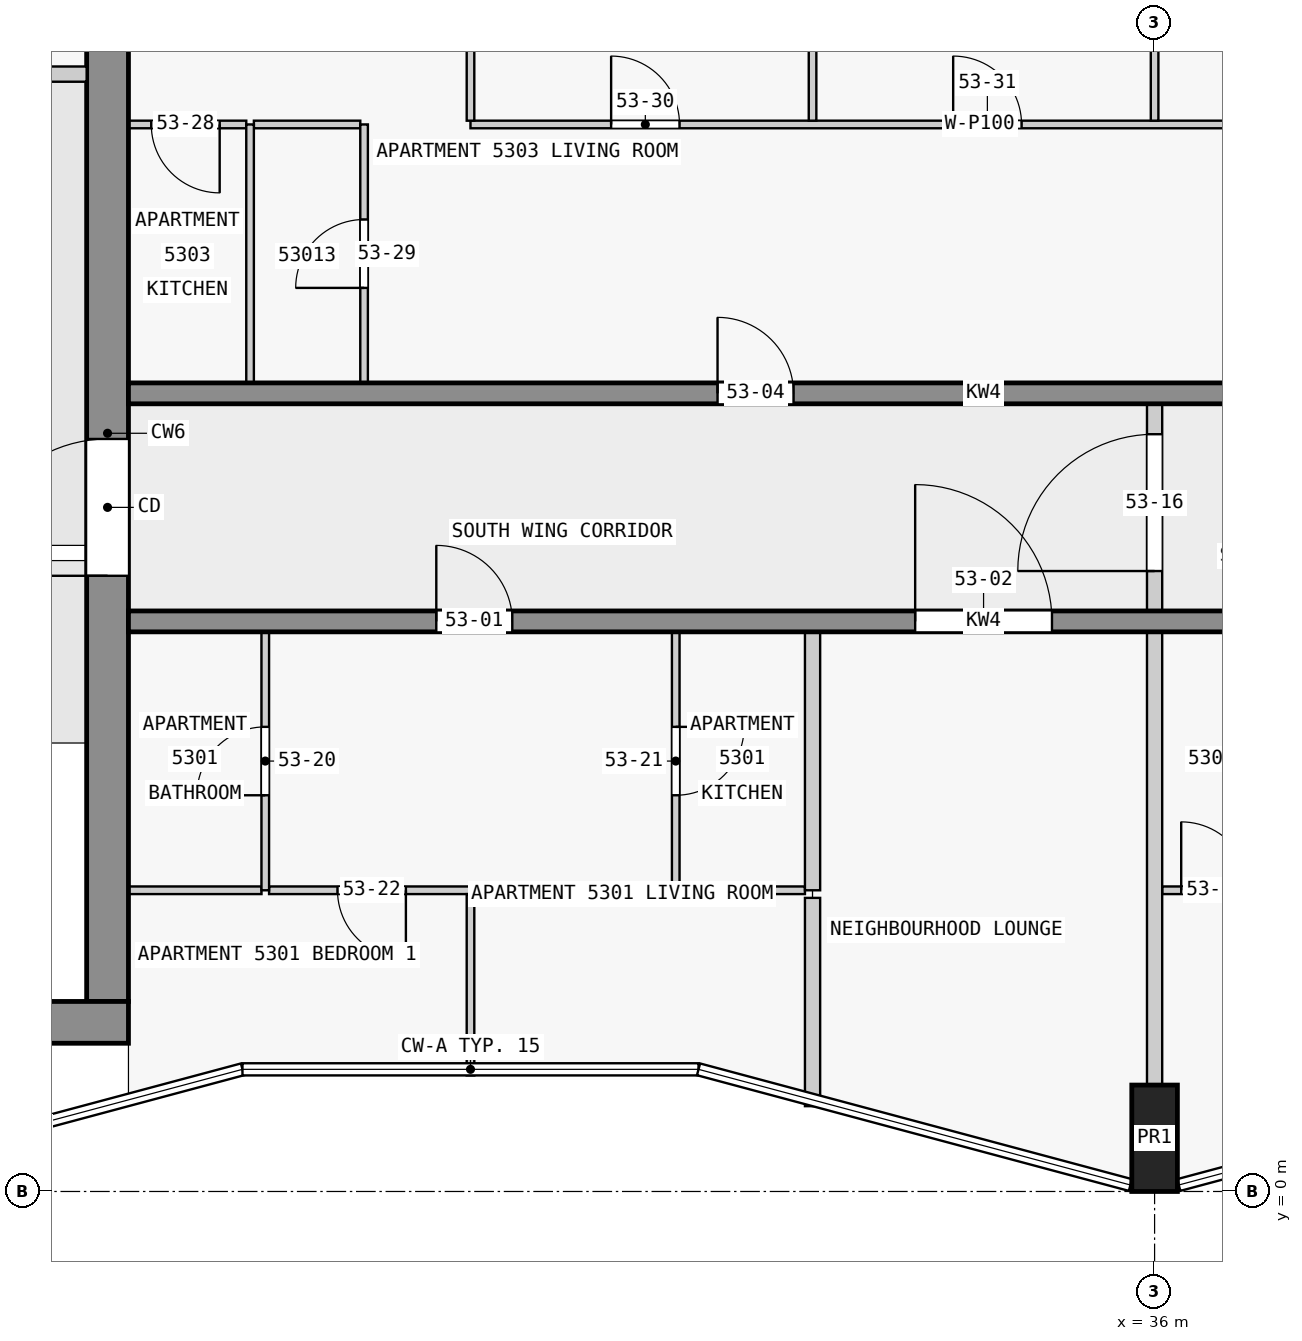
"""IFC4 building model, lengths in metres.
Left out: names, types, materials, properties, quantities, classifications, styles, units other than length and angle.
Written with IfcOpenShell. Run it as: python <this file> out.ifc"""

import sys

from ifc_helpers import new_model, si_unit, direction, frame, frame_2d, origin, origin_2d, place, context, subcontext, project, spatial, rectangle, extrude, element, fill, save


model = new_model("IFC4")
c1 = context("Model", 3, precision=1e-05, world=origin(), true_north=direction((0.0, 1.0)))
c2 = subcontext(c1, "Body", "Model", "MODEL_VIEW")
j1 = project(units=[si_unit("LENGTHUNIT", "METRE"), si_unit("PLANEANGLEUNIT", "RADIAN")], contexts=[c1])
p1 = place(None, origin())
s1 = spatial("IfcSite", under=j1, at=p1, CompositionType="ELEMENT")
p2 = place(p1, origin())
s2 = spatial("IfcBuilding", under=s1, at=p2, CompositionType="ELEMENT")
p3 = place(p2, frame((0.0, 0.0, 204.9)))
s3 = spatial("IfcBuildingStorey", under=s2, at=p3, CompositionType="ELEMENT", Elevation=204.9)
p4 = place(p3, frame((36.0, 0.7, 0.0), z_axis=(0.0, 0.0, 1.0), x_axis=(1.0, 0.0, 0.0)))
e1 = element("IfcColumn", 1, at=p4, inside=s3, PredefinedType="COLUMN", context=c2, shape_type="SweptSolid", body=[
    extrude(rectangle(XDim=0.6, YDim=1.4, at=origin_2d()), origin(), (0.0, 0.0, 1.0), 3.5),
])
p5 = place(p3, frame((1.75, 2.225, 0.0), z_axis=(0.0, 0.0, 1.0), x_axis=(1.0, 0.0, 0.0)))
e2 = element("IfcWall", 2, at=p5, inside=s3, PredefinedType="SHEAR", context=c2, shape_type="SweptSolid", body=[
    extrude(rectangle(XDim=20.75, YDim=0.55, at=frame_2d((10.375, 0.0))), origin(), (0.0, 0.0, 1.0), 3.25),
])
p6 = place(p3, frame((22.225, 2.5, 0.0), z_axis=(0.0, 0.0, 1.0), x_axis=(0.0, 1.0, 0.0)))
e3 = element("IfcWall", 3, at=p6, inside=s3, PredefinedType="SHEAR", context=c2, shape_type="SweptSolid", body=[
    extrude(rectangle(XDim=14.95, YDim=0.55, at=frame_2d((7.475, 0.0))), origin(), (0.0, 0.0, 1.0), 3.25),
])
p7 = place(p6, frame((5.6, 0.0, 0.0)))
e4 = element("IfcOpeningElement", 4, at=p7, cuts=e3, PredefinedType="OPENING", context=c2, shape_type="SweptSolid", body=[
    extrude(rectangle(XDim=1.8, YDim=2.1, at=frame_2d((0.9, 1.05))), frame((0.0, 0.285, 0.0), z_axis=(0.0, -1.0, 0.0), x_axis=(1.0, 0.0, 0.0)), (0.0, 0.0, 1.0), 0.57),
])
p8 = place(p3, frame((22.5, 7.5, 0.0), z_axis=(0.0, 0.0, 1.0), x_axis=(1.0, 0.0, 0.0)))
e5 = element("IfcWall", 5, at=p8, inside=s3, PredefinedType="SHEAR", context=c2, shape_type="SweptSolid", body=[
    extrude(rectangle(XDim=22.5, YDim=0.275, at=frame_2d((11.25, 0.0))), origin(), (0.0, 0.0, 1.0), 3.25),
])
p9 = place(p8, frame((4.05, 0.0, 0.0)))
e6 = element("IfcOpeningElement", 6, at=p9, cuts=e5, PredefinedType="OPENING", context=c2, shape_type="SweptSolid", body=[
    extrude(rectangle(XDim=1.0, YDim=2.1, at=frame_2d((0.5, 1.05))), frame((0.0, 0.147, 0.0), z_axis=(0.0, -1.0, 0.0), x_axis=(1.0, 0.0, 0.0)), (0.0, 0.0, 1.0), 0.295),
])
p10 = place(p8, frame((10.35, 0.0, 0.0)))
e7 = element("IfcOpeningElement", 7, at=p10, cuts=e5, PredefinedType="OPENING", context=c2, shape_type="SweptSolid", body=[
    extrude(rectangle(XDim=1.8, YDim=2.1, at=frame_2d((0.9, 1.05))), frame((0.0, 0.147, 0.0), z_axis=(0.0, -1.0, 0.0), x_axis=(1.0, 0.0, 0.0)), (0.0, 0.0, 1.0), 0.295),
])
p11 = place(p8, frame((16.85, 0.0, 0.0)))
e8 = element("IfcOpeningElement", 8, at=p11, cuts=e5, PredefinedType="OPENING", context=c2, shape_type="SweptSolid", body=[
    extrude(rectangle(XDim=1.0, YDim=2.1, at=frame_2d((0.5, 1.05))), frame((0.0, 0.147, 0.0), z_axis=(0.0, -1.0, 0.0), x_axis=(1.0, 0.0, 0.0)), (0.0, 0.0, 1.0), 0.295),
])
p12 = place(p3, frame((22.5, 10.5, 0.0), z_axis=(0.0, 0.0, 1.0), x_axis=(1.0, 0.0, 0.0)))
e9 = element("IfcWall", 9, at=p12, inside=s3, PredefinedType="SHEAR", context=c2, shape_type="SweptSolid", body=[
    extrude(rectangle(XDim=22.5, YDim=0.275, at=frame_2d((11.25, 0.0))), origin(), (0.0, 0.0, 1.0), 3.25),
])
p13 = place(p12, frame((7.75, 0.0, 0.0)))
e10 = element("IfcOpeningElement", 10, at=p13, cuts=e9, PredefinedType="OPENING", context=c2, shape_type="SweptSolid", body=[
    extrude(rectangle(XDim=1.0, YDim=2.1, at=frame_2d((0.5, 1.05))), frame((0.0, 0.147, 0.0), z_axis=(0.0, -1.0, 0.0), x_axis=(1.0, 0.0, 0.0)), (0.0, 0.0, 1.0), 0.295),
])
p14 = place(p12, frame((18.75, 0.0, 0.0)))
e11 = element("IfcOpeningElement", 11, at=p14, cuts=e9, PredefinedType="OPENING", context=c2, shape_type="SweptSolid", body=[
    extrude(rectangle(XDim=0.9, YDim=2.1, at=frame_2d((0.45, 1.05))), frame((0.0, 0.147, 0.0), z_axis=(0.0, -1.0, 0.0), x_axis=(1.0, 0.0, 0.0)), (0.0, 0.0, 1.0), 0.295),
])
p15 = place(p12, frame((20.95, 0.0, 0.0)))
e12 = element("IfcOpeningElement", 12, at=p15, cuts=e9, PredefinedType="OPENING", context=c2, shape_type="SweptSolid", body=[
    extrude(rectangle(XDim=1.0, YDim=2.1, at=frame_2d((0.5, 1.05))), frame((0.0, 0.147, 0.0), z_axis=(0.0, -1.0, 0.0), x_axis=(1.0, 0.0, 0.0)), (0.0, 0.0, 1.0), 0.295),
])
p16 = place(p3, frame((18.6, 14.7, 0.0), z_axis=(0.0, 0.0, 1.0), x_axis=(1.0, 0.0, 0.0)))
e13 = element("IfcWall", 13, at=p16, inside=s3, PredefinedType="PARTITIONING", context=c2, shape_type="SweptSolid", body=[
    extrude(rectangle(XDim=3.35, YDim=0.2, at=frame_2d((1.675, 0.0))), origin(), (0.0, 0.0, 1.0), 3.25),
])
p17 = place(p16, frame((0.15, 0.0, 0.0)))
e14 = element("IfcOpeningElement", 14, at=p17, cuts=e13, PredefinedType="OPENING", context=c2, shape_type="SweptSolid", body=[
    extrude(rectangle(XDim=0.9, YDim=2.1, at=frame_2d((0.45, 1.05))), frame((0.0, 0.11, 0.0), z_axis=(0.0, -1.0, 0.0), x_axis=(1.0, 0.0, 0.0)), (0.0, 0.0, 1.0), 0.22),
])
p18 = place(p16, frame((1.825, 0.0, 0.0)))
e15 = element("IfcOpeningElement", 15, at=p18, cuts=e13, PredefinedType="OPENING", context=c2, shape_type="SweptSolid", body=[
    extrude(rectangle(XDim=0.9, YDim=2.1, at=frame_2d((0.45, 1.05))), frame((0.0, 0.11, 0.0), z_axis=(0.0, -1.0, 0.0), x_axis=(1.0, 0.0, 0.0)), (0.0, 0.0, 1.0), 0.22),
])
p19 = place(p3, frame((27.0, 3.962, 0.0), z_axis=(0.0, 0.0, 1.0), x_axis=(-1.0, 0.0, 0.0)))
e16 = element("IfcWall", 16, at=p19, inside=s3, PredefinedType="PARTITIONING", context=c2, shape_type="SweptSolid", body=[
    extrude(rectangle(XDim=2.65, YDim=0.1, at=frame_2d((1.325, 0.0))), origin(), (0.0, 0.0, 1.0), 3.25),
])
p20 = place(p19, frame((0.85, 0.0, 0.0)))
e17 = element("IfcOpeningElement", 17, at=p20, cuts=e16, PredefinedType="OPENING", context=c2, shape_type="SweptSolid", body=[
    extrude(rectangle(XDim=0.9, YDim=2.1, at=frame_2d((0.45, 1.05))), frame((0.0, 0.06, 0.0), z_axis=(0.0, -1.0, 0.0), x_axis=(1.0, 0.0, 0.0)), (0.0, 0.0, 1.0), 0.12),
])
p21 = place(p3, frame((22.5, 3.962, 0.0), z_axis=(0.0, 0.0, 1.0), x_axis=(1.0, 0.0, 0.0)))
e18 = element("IfcWall", 18, at=p21, inside=s3, PredefinedType="PARTITIONING", context=c2, shape_type="SweptSolid", body=[
    extrude(rectangle(XDim=1.75, YDim=0.1, at=frame_2d((0.875, 0.0))), origin(), (0.0, 0.0, 1.0), 3.25),
])
p22 = place(p3, frame((29.75, 3.962, 0.0), z_axis=(0.0, 0.0, 1.0), x_axis=(1.0, 0.0, 0.0)))
e19 = element("IfcWall", 19, at=p22, inside=s3, PredefinedType="PARTITIONING", context=c2, shape_type="SweptSolid", body=[
    extrude(rectangle(XDim=1.65, YDim=0.1, at=frame_2d((0.825, 0.0))), origin(), (0.0, 0.0, 1.0), 3.25),
])
p23 = place(p3, frame((36.1, 3.962, 0.0), z_axis=(0.0, 0.0, 1.0), x_axis=(1.0, 0.0, 0.0)))
e20 = element("IfcWall", 20, at=p23, inside=s3, PredefinedType="PARTITIONING", context=c2, shape_type="SweptSolid", body=[
    extrude(rectangle(XDim=1.45, YDim=0.1, at=frame_2d((0.725, 0.0))), origin(), (0.0, 0.0, 1.0), 3.25),
])
p24 = place(p23, frame((0.25, 0.0, 0.0)))
e21 = element("IfcOpeningElement", 21, at=p24, cuts=e20, PredefinedType="OPENING", context=c2, shape_type="SweptSolid", body=[
    extrude(rectangle(XDim=0.9, YDim=2.1, at=frame_2d((0.45, 1.05))), frame((0.0, 0.06, 0.0), z_axis=(0.0, -1.0, 0.0), x_axis=(1.0, 0.0, 0.0)), (0.0, 0.0, 1.0), 0.12),
])
p25 = place(p3, frame((24.05, 14.038, 0.0), z_axis=(0.0, 0.0, 1.0), x_axis=(-1.0, 0.0, 0.0)))
e22 = element("IfcWall", 22, at=p25, inside=s3, PredefinedType="PARTITIONING", context=c2, shape_type="SweptSolid", body=[
    extrude(rectangle(XDim=1.55, YDim=0.1, at=frame_2d((0.775, 0.0))), origin(), (0.0, 0.0, 1.0), 3.25),
])
p26 = place(p25, frame((0.35, 0.0, 0.0)))
e23 = element("IfcOpeningElement", 23, at=p26, cuts=e22, PredefinedType="OPENING", context=c2, shape_type="SweptSolid", body=[
    extrude(rectangle(XDim=0.9, YDim=2.1, at=frame_2d((0.45, 1.05))), frame((0.0, 0.06, 0.0), z_axis=(0.0, -1.0, 0.0), x_axis=(1.0, 0.0, 0.0)), (0.0, 0.0, 1.0), 0.12),
])
p27 = place(p3, frame((25.55, 14.038, 0.0), z_axis=(0.0, 0.0, 1.0), x_axis=(-1.0, 0.0, 0.0)))
e24 = element("IfcWall", 24, at=p27, inside=s3, PredefinedType="PARTITIONING", context=c2, shape_type="SweptSolid", body=[
    extrude(rectangle(XDim=1.4, YDim=0.1, at=frame_2d((0.7, 0.0))), origin(), (0.0, 0.0, 1.0), 3.25),
])
p28 = place(p3, frame((27.0, 14.038, 0.0), z_axis=(0.0, 0.0, 1.0), x_axis=(1.0, 0.0, 0.0)))
e25 = element("IfcWall", 25, at=p28, inside=s3, PredefinedType="PARTITIONING", context=c2, shape_type="SweptSolid", body=[
    extrude(rectangle(XDim=13.4, YDim=0.1, at=frame_2d((6.7, 0.0))), origin(), (0.0, 0.0, 1.0), 3.25),
])
p29 = place(p28, frame((1.85, 0.0, 0.0)))
e26 = element("IfcOpeningElement", 26, at=p29, cuts=e25, PredefinedType="OPENING", context=c2, shape_type="SweptSolid", body=[
    extrude(rectangle(XDim=0.9, YDim=2.1, at=frame_2d((0.45, 1.05))), frame((0.0, 0.06, 0.0), z_axis=(0.0, -1.0, 0.0), x_axis=(1.0, 0.0, 0.0)), (0.0, 0.0, 1.0), 0.12),
])
p30 = place(p28, frame((6.35, 0.0, 0.0)))
e27 = element("IfcOpeningElement", 27, at=p30, cuts=e25, PredefinedType="OPENING", context=c2, shape_type="SweptSolid", body=[
    extrude(rectangle(XDim=0.9, YDim=2.1, at=frame_2d((0.45, 1.05))), frame((0.0, 0.06, 0.0), z_axis=(0.0, -1.0, 0.0), x_axis=(1.0, 0.0, 0.0)), (0.0, 0.0, 1.0), 0.12),
])
p31 = place(p28, frame((10.75, 0.0, 0.0)))
e28 = element("IfcOpeningElement", 28, at=p31, cuts=e25, PredefinedType="OPENING", context=c2, shape_type="SweptSolid", body=[
    extrude(rectangle(XDim=0.9, YDim=2.1, at=frame_2d((0.45, 1.05))), frame((0.0, 0.06, 0.0), z_axis=(0.0, -1.0, 0.0), x_axis=(1.0, 0.0, 0.0)), (0.0, 0.0, 1.0), 0.12),
])
p32 = place(p3, frame((24.1, 10.637, 0.0), z_axis=(0.0, 0.0, 1.0), x_axis=(0.0, 1.0, 0.0)))
e29 = element("IfcWall", 29, at=p32, inside=s3, PredefinedType="PARTITIONING", context=c2, shape_type="SweptSolid", body=[
    extrude(rectangle(XDim=3.4, YDim=0.1, at=frame_2d((1.7, 0.0))), origin(), (0.0, 0.0, 1.0), 3.25),
])
p33 = place(p3, frame((24.3, 3.962, 0.0), z_axis=(0.0, 0.0, 1.0), x_axis=(0.0, 1.0, 0.0)))
e30 = element("IfcWall", 30, at=p33, inside=s3, PredefinedType="PARTITIONING", context=c2, shape_type="SweptSolid", body=[
    extrude(rectangle(XDim=3.4, YDim=0.1, at=frame_2d((1.7, 0.0))), origin(), (0.0, 0.0, 1.0), 3.25),
])
p34 = place(p33, frame((1.25, 0.0, 0.0)))
e31 = element("IfcOpeningElement", 31, at=p34, cuts=e30, PredefinedType="OPENING", context=c2, shape_type="SweptSolid", body=[
    extrude(rectangle(XDim=0.9, YDim=2.1, at=frame_2d((0.45, 1.05))), frame((0.0, 0.06, 0.0), z_axis=(0.0, -1.0, 0.0), x_axis=(1.0, 0.0, 0.0)), (0.0, 0.0, 1.0), 0.12),
])
p35 = place(p3, frame((25.6, 10.637, 0.0), z_axis=(0.0, 0.0, 1.0), x_axis=(0.0, 1.0, 0.0)))
e32 = element("IfcWall", 32, at=p35, inside=s3, PredefinedType="PARTITIONING", context=c2, shape_type="SweptSolid", body=[
    extrude(rectangle(XDim=3.4, YDim=0.1, at=frame_2d((1.7, 0.0))), origin(), (0.0, 0.0, 1.0), 3.25),
])
p36 = place(p35, frame((1.25, 0.0, 0.0)))
e33 = element("IfcOpeningElement", 33, at=p36, cuts=e32, PredefinedType="OPENING", context=c2, shape_type="SweptSolid", body=[
    extrude(rectangle(XDim=0.9, YDim=2.1, at=frame_2d((0.45, 1.05))), frame((0.0, 0.06, 0.0), z_axis=(0.0, -1.0, 0.0), x_axis=(1.0, 0.0, 0.0)), (0.0, 0.0, 1.0), 0.12),
])
for number, where, z_axis, x_axis in (
    (34, (27.0, 16.473, 0.0), (0.0, 0.0, 1.0), (0.0, -1.0, 0.0)),
    (35, (27.0, 1.527, 0.0), (0.0, 0.0, 1.0), (0.0, 1.0, 0.0)),
):
    element("IfcWall", number, at=place(p3, frame(where, z_axis=z_axis, x_axis=x_axis)), inside=s3, PredefinedType="PARTITIONING", context=c2, shape_type="SweptSolid", body=[
        extrude(rectangle(XDim=2.386, YDim=0.1, at=frame_2d((1.193, 0.0))), origin(), (0.0, 0.0, 1.0), 3.25),
    ])
p37 = place(p3, frame((29.7, 7.363, 0.0), z_axis=(0.0, 0.0, 1.0), x_axis=(0.0, -1.0, 0.0)))
e36 = element("IfcWall", 36, at=p37, inside=s3, PredefinedType="PARTITIONING", context=c2, shape_type="SweptSolid", body=[
    extrude(rectangle(XDim=3.4, YDim=0.1, at=frame_2d((1.7, 0.0))), origin(), (0.0, 0.0, 1.0), 3.25),
])
p38 = place(p37, frame((1.25, 0.0, 0.0)))
e37 = element("IfcOpeningElement", 37, at=p38, cuts=e36, PredefinedType="OPENING", context=c2, shape_type="SweptSolid", body=[
    extrude(rectangle(XDim=0.9, YDim=2.1, at=frame_2d((0.45, 1.05))), frame((0.0, 0.06, 0.0), z_axis=(0.0, -1.0, 0.0), x_axis=(1.0, 0.0, 0.0)), (0.0, 0.0, 1.0), 0.12),
])
p39 = place(p3, frame((31.5, 14.087, 0.0), z_axis=(0.0, 0.0, 1.0), x_axis=(0.0, 1.0, 0.0)))
e38 = element("IfcWall", 38, at=p39, inside=s3, PredefinedType="PARTITIONING", context=c2, shape_type="SweptSolid", body=[
    extrude(rectangle(XDim=2.79, YDim=0.1, at=frame_2d((1.395, 0.0))), origin(), (0.0, 0.0, 1.0), 3.25),
])
p40 = place(p3, frame((31.5, 3.863, 0.0), z_axis=(0.0, 0.0, 1.0), x_axis=(0.0, -1.0, 0.0)))
e39 = element("IfcWall", 39, at=p40, inside=s3, PredefinedType="PARTITIONING", context=c2, shape_type="SweptSolid", body=[
    extrude(rectangle(XDim=2.74, YDim=0.2, at=frame_2d((1.37, 0.0))), origin(), (0.0, 0.0, 1.0), 3.25),
])
p41 = place(p3, frame((31.5, 3.962, 0.0), z_axis=(0.0, 0.0, 1.0), x_axis=(0.0, 1.0, 0.0)))
e40 = element("IfcWall", 40, at=p41, inside=s3, PredefinedType="PARTITIONING", context=c2, shape_type="SweptSolid", body=[
    extrude(rectangle(XDim=3.4, YDim=0.2, at=frame_2d((1.7, 0.0))), origin(), (0.0, 0.0, 1.0), 3.25),
])
p42 = place(p3, frame((36.0, 14.087, 0.0), z_axis=(0.0, 0.0, 1.0), x_axis=(0.0, 1.0, 0.0)))
e41 = element("IfcWall", 41, at=p42, inside=s3, PredefinedType="PARTITIONING", context=c2, shape_type="SweptSolid", body=[
    extrude(rectangle(XDim=2.513, YDim=0.1, at=frame_2d((1.256, 0.0))), origin(), (0.0, 0.0, 1.0), 3.25),
])
p43 = place(p3, frame((36.0, 1.4, 0.0), z_axis=(0.0, 0.0, 1.0), x_axis=(0.0, 1.0, 0.0)))
e42 = element("IfcWall", 42, at=p43, inside=s3, PredefinedType="PARTITIONING", context=c2, shape_type="SweptSolid", body=[
    extrude(rectangle(XDim=5.963, YDim=0.2, at=frame_2d((2.981, 0.0))), origin(), (0.0, 0.0, 1.0), 3.25),
])
p44 = place(p3, frame((36.0, 7.462, 0.0), z_axis=(0.0, 0.0, 1.0), x_axis=(0.0, 1.0, 0.0)))
e43 = element("IfcWall", 43, at=p44, inside=s3, PredefinedType="PARTITIONING", context=c2, shape_type="SweptSolid", body=[
    extrude(rectangle(XDim=3.175, YDim=0.2, at=frame_2d((1.587, 0.0))), origin(), (0.0, 0.0, 1.0), 3.25),
])
p45 = place(p44, frame((0.7, 0.0, 0.0)))
e44 = element("IfcOpeningElement", 44, at=p45, cuts=e43, PredefinedType="OPENING", context=c2, shape_type="SweptSolid", body=[
    extrude(rectangle(XDim=1.8, YDim=2.1, at=frame_2d((0.9, 1.05))), frame((0.0, 0.11, 0.0), z_axis=(0.0, -1.0, 0.0), x_axis=(1.0, 0.0, 0.0)), (0.0, 0.0, 1.0), 0.22),
])
p46 = place(p7, origin())
e45 = element("IfcDoor", 45, at=p46, inside=s3, OperationType="DOUBLE_DOOR_SINGLE_SWING", PredefinedType="DOOR", context=c2, shape_type="SweptSolid", body=[
    extrude(rectangle(XDim=1.8, YDim=2.1, at=frame_2d((0.9, 1.05))), frame((0.0, 0.025, 0.0), z_axis=(0.0, -1.0, 0.0), x_axis=(1.0, 0.0, 0.0)), (0.0, 0.0, 1.0), 0.05),
])
fill(e4, e45)
p47 = place(p9, origin())
e46 = element("IfcDoor", 46, at=p47, inside=s3, OperationType="SINGLE_SWING_LEFT", PredefinedType="DOOR", context=c2, shape_type="SweptSolid", body=[
    extrude(rectangle(XDim=1.0, YDim=2.1, at=frame_2d((0.5, 1.05))), frame((0.0, 0.025, 0.0), z_axis=(0.0, -1.0, 0.0), x_axis=(1.0, 0.0, 0.0)), (0.0, 0.0, 1.0), 0.05),
])
fill(e6, e46)
p48 = place(p10, origin())
e47 = element("IfcDoor", 47, at=p48, inside=s3, OperationType="SINGLE_SWING_LEFT", PredefinedType="DOOR", context=c2, shape_type="SweptSolid", body=[
    extrude(rectangle(XDim=1.8, YDim=2.1, at=frame_2d((0.9, 1.05))), frame((0.0, 0.025, 0.0), z_axis=(0.0, -1.0, 0.0), x_axis=(1.0, 0.0, 0.0)), (0.0, 0.0, 1.0), 0.05),
])
fill(e7, e47)
p49 = place(p13, origin())
e48 = element("IfcDoor", 48, at=p49, inside=s3, OperationType="SINGLE_SWING_LEFT", PredefinedType="DOOR", context=c2, shape_type="SweptSolid", body=[
    extrude(rectangle(XDim=1.0, YDim=2.1, at=frame_2d((0.5, 1.05))), frame((0.0, 0.025, 0.0), z_axis=(0.0, -1.0, 0.0), x_axis=(1.0, 0.0, 0.0)), (0.0, 0.0, 1.0), 0.05),
])
fill(e10, e48)
p50 = place(p45, origin())
e49 = element("IfcDoor", 49, at=p50, inside=s3, OperationType="SINGLE_SWING_RIGHT", PredefinedType="DOOR", context=c2, shape_type="SweptSolid", body=[
    extrude(rectangle(XDim=1.8, YDim=2.1, at=frame_2d((0.9, 1.05))), frame((0.0, 0.025, 0.0), z_axis=(0.0, -1.0, 0.0), x_axis=(1.0, 0.0, 0.0)), (0.0, 0.0, 1.0), 0.05),
])
fill(e44, e49)
p51 = place(p34, origin())
e50 = element("IfcDoor", 50, at=p51, inside=s3, OperationType="SINGLE_SWING_LEFT", PredefinedType="DOOR", context=c2, shape_type="SweptSolid", body=[
    extrude(rectangle(XDim=0.9, YDim=2.1, at=frame_2d((0.45, 1.05))), frame((0.0, 0.025, 0.0), z_axis=(0.0, -1.0, 0.0), x_axis=(1.0, 0.0, 0.0)), (0.0, 0.0, 1.0), 0.05),
])
fill(e31, e50)
p52 = place(p38, origin())
e51 = element("IfcDoor", 51, at=p52, inside=s3, OperationType="SINGLE_SWING_LEFT", PredefinedType="DOOR", context=c2, shape_type="SweptSolid", body=[
    extrude(rectangle(XDim=0.9, YDim=2.1, at=frame_2d((0.45, 1.05))), frame((0.0, 0.025, 0.0), z_axis=(0.0, -1.0, 0.0), x_axis=(1.0, 0.0, 0.0)), (0.0, 0.0, 1.0), 0.05),
])
fill(e37, e51)
p53 = place(p20, origin())
e52 = element("IfcDoor", 52, at=p53, inside=s3, OperationType="SINGLE_SWING_LEFT", PredefinedType="DOOR", context=c2, shape_type="SweptSolid", body=[
    extrude(rectangle(XDim=0.9, YDim=2.1, at=frame_2d((0.45, 1.05))), frame((0.0, 0.025, 0.0), z_axis=(0.0, -1.0, 0.0), x_axis=(1.0, 0.0, 0.0)), (0.0, 0.0, 1.0), 0.05),
])
fill(e17, e52)
p54 = place(p24, origin())
e53 = element("IfcDoor", 53, at=p54, inside=s3, OperationType="SINGLE_SWING_LEFT", PredefinedType="DOOR", context=c2, shape_type="SweptSolid", body=[
    extrude(rectangle(XDim=0.9, YDim=2.1, at=frame_2d((0.45, 1.05))), frame((0.0, 0.025, 0.0), z_axis=(0.0, -1.0, 0.0), x_axis=(1.0, 0.0, 0.0)), (0.0, 0.0, 1.0), 0.05),
])
fill(e21, e53)
p55 = place(p26, origin())
e54 = element("IfcDoor", 54, at=p55, inside=s3, OperationType="SINGLE_SWING_RIGHT", PredefinedType="DOOR", context=c2, shape_type="SweptSolid", body=[
    extrude(rectangle(XDim=0.9, YDim=2.1, at=frame_2d((0.45, 1.05))), frame((0.0, 0.025, 0.0), z_axis=(0.0, -1.0, 0.0), x_axis=(1.0, 0.0, 0.0)), (0.0, 0.0, 1.0), 0.05),
])
fill(e23, e54)
p56 = place(p36, origin())
e55 = element("IfcDoor", 55, at=p56, inside=s3, OperationType="SINGLE_SWING_LEFT", PredefinedType="DOOR", context=c2, shape_type="SweptSolid", body=[
    extrude(rectangle(XDim=0.9, YDim=2.1, at=frame_2d((0.45, 1.05))), frame((0.0, 0.025, 0.0), z_axis=(0.0, -1.0, 0.0), x_axis=(1.0, 0.0, 0.0)), (0.0, 0.0, 1.0), 0.05),
])
fill(e33, e55)
p57 = place(p29, origin())
e56 = element("IfcDoor", 56, at=p57, inside=s3, OperationType="SINGLE_SWING_LEFT", PredefinedType="DOOR", context=c2, shape_type="SweptSolid", body=[
    extrude(rectangle(XDim=0.9, YDim=2.1, at=frame_2d((0.45, 1.05))), frame((0.0, 0.025, 0.0), z_axis=(0.0, -1.0, 0.0), x_axis=(1.0, 0.0, 0.0)), (0.0, 0.0, 1.0), 0.05),
])
fill(e26, e56)
p58 = place(p30, origin())
e57 = element("IfcDoor", 57, at=p58, inside=s3, OperationType="SINGLE_SWING_RIGHT", PredefinedType="DOOR", context=c2, shape_type="SweptSolid", body=[
    extrude(rectangle(XDim=0.9, YDim=2.1, at=frame_2d((0.45, 1.05))), frame((0.0, 0.025, 0.0), z_axis=(0.0, -1.0, 0.0), x_axis=(1.0, 0.0, 0.0)), (0.0, 0.0, 1.0), 0.05),
])
fill(e27, e57)
save(model, sys.argv[1])
